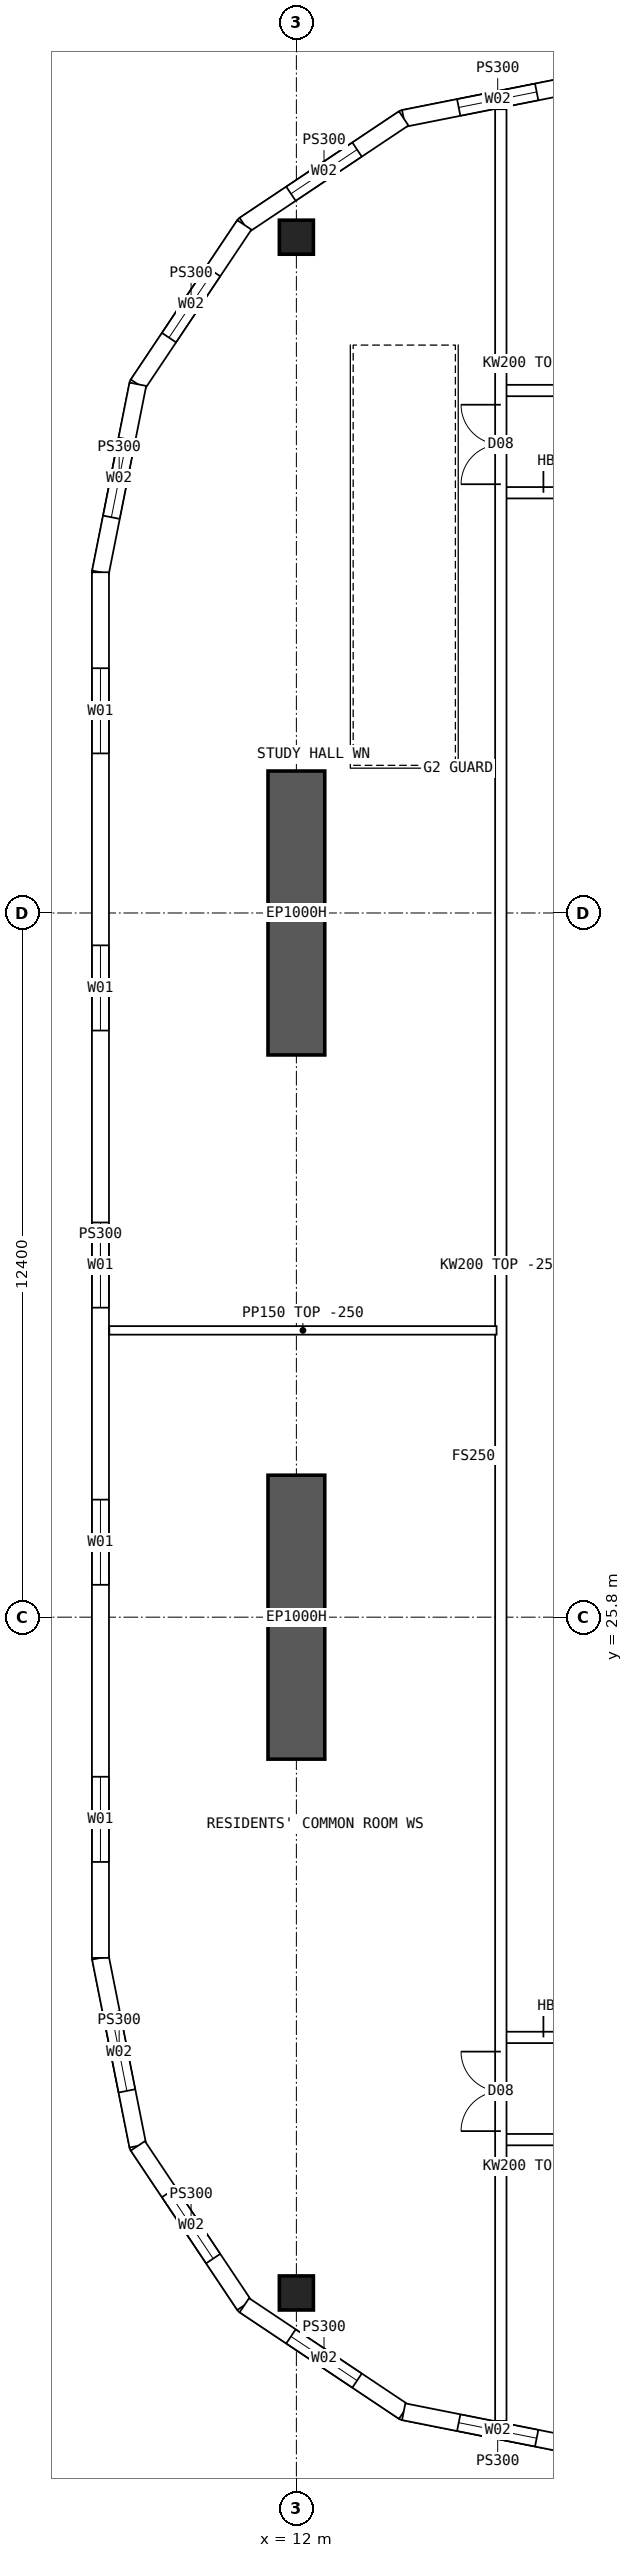
"""IFC4 building model, lengths in metres.
Left out: names, types, materials, properties, quantities, classifications, styles, units other than length and angle.
Written with IfcOpenShell. Run it as: python <this file> out.ifc"""

import sys

from ifc_helpers import new_model, si_unit, direction, frame, frame_2d, origin, origin_2d, place, context, subcontext, project, spatial, polyline, rectangle, hollow_rectangle, outline, extrude, element, fill, save


model = new_model("IFC4")
c1 = context("Model", 3, precision=1e-05, world=origin(), true_north=direction((0.0, 1.0)))
c2 = subcontext(c1, "Body", "Model", "MODEL_VIEW")
j1 = project(units=[si_unit("LENGTHUNIT", "METRE"), si_unit("PLANEANGLEUNIT", "RADIAN")], contexts=[c1])
p1 = place(None, origin())
s1 = spatial("IfcSite", under=j1, at=p1, CompositionType="ELEMENT")
p2 = place(p1, origin())
s2 = spatial("IfcBuilding", under=s1, at=p2, CompositionType="ELEMENT")
p3 = place(p2, frame((0.0, 0.0, 250.3)))
s3 = spatial("IfcBuildingStorey", under=s2, at=p3, CompositionType="ELEMENT", Elevation=250.3)
for number, where, z_axis, x_axis in (
    (1, (12.0, 13.9, 0.0), (0.0, 0.0, 1.0), (1.0, 0.0, 0.0)),
    (2, (12.0, 50.1, 0.0), (0.0, 0.0, 1.0), (1.0, 0.0, 0.0)),
):
    element("IfcColumn", number, at=place(p3, frame(where, z_axis=z_axis, x_axis=x_axis)), inside=s3, PredefinedType="COLUMN", context=c2, shape_type="SweptSolid", body=[
        extrude(hollow_rectangle(XDim=0.6, YDim=0.6, WallThickness=0.06, at=origin_2d()), origin(), (0.0, 0.0, 1.0), 3.75),
    ])
for number, where, z_axis, x_axis in (
    (3, (12.0, 23.3, 0.0), (0.0, 0.0, 1.0), (0.0, 1.0, 0.0)),
    (4, (12.0, 35.7, 0.0), (0.0, 0.0, 1.0), (0.0, 1.0, 0.0)),
):
    element("IfcWall", number, at=place(p3, frame(where, z_axis=z_axis, x_axis=x_axis)), inside=s3, PredefinedType="SHEAR", context=c2, shape_type="SweptSolid", body=[
        extrude(rectangle(XDim=5.0, YDim=1.0, at=frame_2d((2.5, 0.0))), origin(), (0.0, 0.0, 1.0), 3.75),
    ])
p4 = place(p3, frame((8.55, 44.2, 0.0), z_axis=(0.0, 0.0, 1.0), x_axis=(0.0, -1.0, 0.0)))
e5 = element("IfcWall", 5, at=p4, inside=s3, PredefinedType="SOLIDWALL", context=c2, shape_type="SweptSolid", body=[
    extrude(outline(polyline([(-0.015, -0.15), (24.415, -0.15), (24.385, 0.15), (0.015, 0.15), (-0.015, -0.15)])), origin(), (0.0, 0.0, 1.0), 3.5),
])
p5 = place(p4, frame((1.69, 0.0, 0.9)))
e6 = element("IfcOpeningElement", 6, at=p5, cuts=e5, PredefinedType="OPENING", context=c2, shape_type="SweptSolid", body=[
    extrude(rectangle(XDim=1.5, YDim=2.0, at=frame_2d((0.75, 1.0))), frame((0.0, 0.16, 0.0), z_axis=(0.0, -1.0, 0.0), x_axis=(1.0, 0.0, 0.0)), (0.0, 0.0, 1.0), 0.32),
])
p6 = place(p4, frame((6.57, 0.0, 0.9)))
e7 = element("IfcOpeningElement", 7, at=p6, cuts=e5, PredefinedType="OPENING", context=c2, shape_type="SweptSolid", body=[
    extrude(rectangle(XDim=1.5, YDim=2.0, at=frame_2d((0.75, 1.0))), frame((0.0, 0.16, 0.0), z_axis=(0.0, -1.0, 0.0), x_axis=(1.0, 0.0, 0.0)), (0.0, 0.0, 1.0), 0.32),
])
p7 = place(p4, frame((11.45, 0.0, 0.9)))
e8 = element("IfcOpeningElement", 8, at=p7, cuts=e5, PredefinedType="OPENING", context=c2, shape_type="SweptSolid", body=[
    extrude(rectangle(XDim=1.5, YDim=2.0, at=frame_2d((0.75, 1.0))), frame((0.0, 0.16, 0.0), z_axis=(0.0, -1.0, 0.0), x_axis=(1.0, 0.0, 0.0)), (0.0, 0.0, 1.0), 0.32),
])
p8 = place(p4, frame((16.33, 0.0, 0.9)))
e9 = element("IfcOpeningElement", 9, at=p8, cuts=e5, PredefinedType="OPENING", context=c2, shape_type="SweptSolid", body=[
    extrude(rectangle(XDim=1.5, YDim=2.0, at=frame_2d((0.75, 1.0))), frame((0.0, 0.16, 0.0), z_axis=(0.0, -1.0, 0.0), x_axis=(1.0, 0.0, 0.0)), (0.0, 0.0, 1.0), 0.32),
])
p9 = place(p4, frame((21.21, 0.0, 0.9)))
e10 = element("IfcOpeningElement", 10, at=p9, cuts=e5, PredefinedType="OPENING", context=c2, shape_type="SweptSolid", body=[
    extrude(rectangle(XDim=1.5, YDim=2.0, at=frame_2d((0.75, 1.0))), frame((0.0, 0.16, 0.0), z_axis=(0.0, -1.0, 0.0), x_axis=(1.0, 0.0, 0.0)), (0.0, 0.0, 1.0), 0.32),
])
p10 = place(p3, frame((17.2, 52.85, 0.0), z_axis=(0.0, 0.0, 1.0), x_axis=(-0.98078325777, -0.195100490205, 0.0)))
e11 = element("IfcWall", 11, at=p10, inside=s3, PredefinedType="SOLIDWALL", context=c2, shape_type="SweptSolid", body=[
    extrude(outline(polyline([(-0.03, -0.15), (3.405, -0.15), (3.345, 0.15), (0.03, 0.15), (-0.03, -0.15)])), origin(), (0.0, 0.0, 1.0), 3.5),
])
p11 = place(p10, frame((0.988, 0.0, 0.9)))
e12 = element("IfcOpeningElement", 12, at=p11, cuts=e11, PredefinedType="OPENING", context=c2, shape_type="SweptSolid", body=[
    extrude(rectangle(XDim=1.4, YDim=1.8, at=frame_2d((0.7, 0.9))), frame((0.0, 0.16, 0.0), z_axis=(0.0, -1.0, 0.0), x_axis=(1.0, 0.0, 0.0)), (0.0, 0.0, 1.0), 0.32),
])
p12 = place(p3, frame((13.89, 52.192, 0.0), z_axis=(0.0, 0.0, 1.0), x_axis=(-0.831460037396, -0.555584562613, 0.0)))
e13 = element("IfcWall", 13, at=p12, inside=s3, PredefinedType="SOLIDWALL", context=c2, shape_type="SweptSolid", body=[
    extrude(outline(polyline([(-0.03, -0.15), (3.405, -0.15), (3.345, 0.15), (0.03, 0.15), (-0.03, -0.15)])), origin(), (0.0, 0.0, 1.0), 3.5),
])
p13 = place(p12, frame((0.988, 0.0, 0.9)))
e14 = element("IfcOpeningElement", 14, at=p13, cuts=e13, PredefinedType="OPENING", context=c2, shape_type="SweptSolid", body=[
    extrude(rectangle(XDim=1.4, YDim=1.8, at=frame_2d((0.7, 0.9))), frame((0.0, 0.16, 0.0), z_axis=(0.0, -1.0, 0.0), x_axis=(1.0, 0.0, 0.0)), (0.0, 0.0, 1.0), 0.32),
])
p14 = place(p3, frame((11.083, 50.316, 0.0), z_axis=(0.0, 0.0, 1.0), x_axis=(-0.555567969291, -0.831471124873, 0.0)))
e15 = element("IfcWall", 15, at=p14, inside=s3, PredefinedType="SOLIDWALL", context=c2, shape_type="SweptSolid", body=[
    extrude(outline(polyline([(-0.03, -0.15), (3.405, -0.15), (3.345, 0.15), (0.03, 0.15), (-0.03, -0.15)])), origin(), (0.0, 0.0, 1.0), 3.5),
])
p15 = place(p14, frame((0.988, 0.0, 0.9)))
e16 = element("IfcOpeningElement", 16, at=p15, cuts=e15, PredefinedType="OPENING", context=c2, shape_type="SweptSolid", body=[
    extrude(rectangle(XDim=1.4, YDim=1.8, at=frame_2d((0.7, 0.9))), frame((0.0, 0.16, 0.0), z_axis=(0.0, -1.0, 0.0), x_axis=(1.0, 0.0, 0.0)), (0.0, 0.0, 1.0), 0.32),
])
p16 = place(p3, frame((9.208, 47.51, 0.0), z_axis=(0.0, 0.0, 1.0), x_axis=(-0.19508664885, -0.980786011034, 0.0)))
e17 = element("IfcWall", 17, at=p16, inside=s3, PredefinedType="SOLIDWALL", context=c2, shape_type="SweptSolid", body=[
    extrude(outline(polyline([(-0.03, -0.15), (3.39, -0.15), (3.36, 0.15), (0.03, 0.15), (-0.03, -0.15)])), origin(), (0.0, 0.0, 1.0), 3.5),
])
p17 = place(p16, frame((0.988, 0.0, 0.9)))
e18 = element("IfcOpeningElement", 18, at=p17, cuts=e17, PredefinedType="OPENING", context=c2, shape_type="SweptSolid", body=[
    extrude(rectangle(XDim=1.4, YDim=1.8, at=frame_2d((0.7, 0.9))), frame((0.0, 0.16, 0.0), z_axis=(0.0, -1.0, 0.0), x_axis=(1.0, 0.0, 0.0)), (0.0, 0.0, 1.0), 0.32),
])
p18 = place(p3, frame((8.55, 19.8, 0.0), z_axis=(0.0, 0.0, 1.0), x_axis=(0.19508664885, -0.980786011034, 0.0)))
e19 = element("IfcWall", 19, at=p18, inside=s3, PredefinedType="SOLIDWALL", context=c2, shape_type="SweptSolid", body=[
    extrude(outline(polyline([(-0.015, -0.15), (3.405, -0.15), (3.345, 0.15), (0.015, 0.15), (-0.015, -0.15)])), origin(), (0.0, 0.0, 1.0), 3.5),
])
p19 = place(p18, frame((0.988, 0.0, 0.9)))
e20 = element("IfcOpeningElement", 20, at=p19, cuts=e19, PredefinedType="OPENING", context=c2, shape_type="SweptSolid", body=[
    extrude(rectangle(XDim=1.4, YDim=1.8, at=frame_2d((0.7, 0.9))), frame((0.0, 0.16, 0.0), z_axis=(0.0, -1.0, 0.0), x_axis=(1.0, 0.0, 0.0)), (0.0, 0.0, 1.0), 0.32),
])
p20 = place(p3, frame((9.208, 16.49, 0.0), z_axis=(0.0, 0.0, 1.0), x_axis=(0.555567969291, -0.831471124873, 0.0)))
e21 = element("IfcWall", 21, at=p20, inside=s3, PredefinedType="SOLIDWALL", context=c2, shape_type="SweptSolid", body=[
    extrude(outline(polyline([(-0.03, -0.15), (3.405, -0.15), (3.345, 0.15), (0.03, 0.15), (-0.03, -0.15)])), origin(), (0.0, 0.0, 1.0), 3.5),
])
p21 = place(p20, frame((0.988, 0.0, 0.9)))
e22 = element("IfcOpeningElement", 22, at=p21, cuts=e21, PredefinedType="OPENING", context=c2, shape_type="SweptSolid", body=[
    extrude(rectangle(XDim=1.4, YDim=1.8, at=frame_2d((0.7, 0.9))), frame((0.0, 0.16, 0.0), z_axis=(0.0, -1.0, 0.0), x_axis=(1.0, 0.0, 0.0)), (0.0, 0.0, 1.0), 0.32),
])
p22 = place(p3, frame((11.083, 13.684, 0.0), z_axis=(0.0, 0.0, 1.0), x_axis=(0.831460037396, -0.555584562613, 0.0)))
e23 = element("IfcWall", 23, at=p22, inside=s3, PredefinedType="SOLIDWALL", context=c2, shape_type="SweptSolid", body=[
    extrude(outline(polyline([(-0.03, -0.15), (3.405, -0.15), (3.345, 0.15), (0.03, 0.15), (-0.03, -0.15)])), origin(), (0.0, 0.0, 1.0), 3.5),
])
p23 = place(p22, frame((0.988, 0.0, 0.9)))
e24 = element("IfcOpeningElement", 24, at=p23, cuts=e23, PredefinedType="OPENING", context=c2, shape_type="SweptSolid", body=[
    extrude(rectangle(XDim=1.4, YDim=1.8, at=frame_2d((0.7, 0.9))), frame((0.0, 0.16, 0.0), z_axis=(0.0, -1.0, 0.0), x_axis=(1.0, 0.0, 0.0)), (0.0, 0.0, 1.0), 0.32),
])
p24 = place(p3, frame((13.89, 11.808, 0.0), z_axis=(0.0, 0.0, 1.0), x_axis=(0.98078325777, -0.195100490205, 0.0)))
e25 = element("IfcWall", 25, at=p24, inside=s3, PredefinedType="SOLIDWALL", context=c2, shape_type="SweptSolid", body=[
    extrude(outline(polyline([(-0.03, -0.15), (3.405, -0.15), (3.345, 0.15), (0.03, 0.15), (-0.03, -0.15)])), origin(), (0.0, 0.0, 1.0), 3.5),
])
p25 = place(p24, frame((0.988, 0.0, 0.9)))
e26 = element("IfcOpeningElement", 26, at=p25, cuts=e25, PredefinedType="OPENING", context=c2, shape_type="SweptSolid", body=[
    extrude(rectangle(XDim=1.4, YDim=1.8, at=frame_2d((0.7, 0.9))), frame((0.0, 0.16, 0.0), z_axis=(0.0, -1.0, 0.0), x_axis=(1.0, 0.0, 0.0)), (0.0, 0.0, 1.0), 0.32),
])
p26 = place(p3, frame((15.6, 16.6, 0.0), z_axis=(0.0, 0.0, 1.0), x_axis=(1.0, 0.0, 0.0)))
e27 = element("IfcWall", 27, at=p26, inside=s3, PredefinedType="SOLIDWALL", context=c2, shape_type="SweptSolid", body=[
    extrude(rectangle(XDim=2.05, YDim=0.2, at=frame_2d((1.025, 0.0))), origin(), (0.0, 0.0, 1.0), 3.5),
])
p27 = place(p26, frame((0.95, 0.0, 0.0)))
e28 = element("IfcOpeningElement", 28, at=p27, cuts=e27, PredefinedType="OPENING", context=c2, shape_type="SweptSolid", body=[
    extrude(rectangle(XDim=0.9, YDim=2.1, at=frame_2d((0.45, 1.05))), frame((0.0, 0.11, 0.0), z_axis=(0.0, -1.0, 0.0), x_axis=(1.0, 0.0, 0.0)), (0.0, 0.0, 1.0), 0.22),
])
p28 = place(p3, frame((15.6, 18.4, 0.0), z_axis=(0.0, 0.0, 1.0), x_axis=(1.0, 0.0, 0.0)))
e29 = element("IfcWall", 29, at=p28, inside=s3, PredefinedType="SOLIDWALL", context=c2, shape_type="SweptSolid", body=[
    extrude(rectangle(XDim=2.05, YDim=0.2, at=frame_2d((1.025, 0.0))), origin(), (0.0, 0.0, 1.0), 3.5),
])
p29 = place(p28, frame((0.75, 0.0, 0.0)))
e30 = element("IfcOpeningElement", 30, at=p29, cuts=e29, PredefinedType="OPENING", context=c2, shape_type="SweptSolid", body=[
    extrude(rectangle(XDim=1.2, YDim=2.1, at=frame_2d((0.6, 1.05))), frame((0.0, 0.11, 0.0), z_axis=(0.0, -1.0, 0.0), x_axis=(1.0, 0.0, 0.0)), (0.0, 0.0, 1.0), 0.22),
])
p30 = place(p3, frame((15.6, 47.4, 0.0), z_axis=(0.0, 0.0, 1.0), x_axis=(1.0, 0.0, 0.0)))
e31 = element("IfcWall", 31, at=p30, inside=s3, PredefinedType="SOLIDWALL", context=c2, shape_type="SweptSolid", body=[
    extrude(rectangle(XDim=2.05, YDim=0.2, at=frame_2d((1.025, 0.0))), origin(), (0.0, 0.0, 1.0), 3.5),
])
p31 = place(p30, frame((0.95, 0.0, 0.0)))
e32 = element("IfcOpeningElement", 32, at=p31, cuts=e31, PredefinedType="OPENING", context=c2, shape_type="SweptSolid", body=[
    extrude(rectangle(XDim=0.9, YDim=2.1, at=frame_2d((0.45, 1.05))), frame((0.0, 0.11, 0.0), z_axis=(0.0, -1.0, 0.0), x_axis=(1.0, 0.0, 0.0)), (0.0, 0.0, 1.0), 0.22),
])
p32 = place(p3, frame((15.6, 45.6, 0.0), z_axis=(0.0, 0.0, 1.0), x_axis=(1.0, 0.0, 0.0)))
e33 = element("IfcWall", 33, at=p32, inside=s3, PredefinedType="SOLIDWALL", context=c2, shape_type="SweptSolid", body=[
    extrude(rectangle(XDim=2.05, YDim=0.2, at=frame_2d((1.025, 0.0))), origin(), (0.0, 0.0, 1.0), 3.5),
])
p33 = place(p32, frame((0.75, 0.0, 0.0)))
e34 = element("IfcOpeningElement", 34, at=p33, cuts=e33, PredefinedType="OPENING", context=c2, shape_type="SweptSolid", body=[
    extrude(rectangle(XDim=1.2, YDim=2.1, at=frame_2d((0.6, 1.05))), frame((0.0, 0.11, 0.0), z_axis=(0.0, -1.0, 0.0), x_axis=(1.0, 0.0, 0.0)), (0.0, 0.0, 1.0), 0.22),
])
p34 = place(p3, frame((8.705, 30.85, 0.0), z_axis=(0.0, 0.0, 1.0), x_axis=(1.0, 0.0, 0.0)))
e35 = element("IfcWall", 35, at=p34, inside=s3, PredefinedType="PARTITIONING", context=c2, shape_type="SweptSolid", body=[
    extrude(outline(polyline([(0.0, 0.0), (6.82, 0.0), (6.82, 3.5), (3.597, 3.5), (3.595, 3.05), (2.997, 3.05), (2.995, 3.5), (0.0, 3.5), (0.0, 0.0)])), frame((0.0, 0.075, 0.0), z_axis=(0.0, -1.0, 0.0), x_axis=(1.0, 0.0, 0.0)), (0.0, 0.0, 1.0), 0.15),
])
p35 = place(p3, frame((15.6, 11.646, 0.0), z_axis=(0.0, 0.0, 1.0), x_axis=(0.0, 1.0, 0.0)))
e36 = element("IfcWall", 36, at=p35, inside=s3, PredefinedType="SOLIDWALL", context=c2, shape_type="SweptSolid", body=[
    extrude(rectangle(XDim=40.708, YDim=0.2, at=frame_2d((20.354, 0.0))), origin(), (0.0, 0.0, 1.0), 3.5),
])
p36 = place(p35, frame((5.104, 0.0, 0.0)))
e37 = element("IfcOpeningElement", 37, at=p36, cuts=e36, PredefinedType="OPENING", context=c2, shape_type="SweptSolid", body=[
    extrude(rectangle(XDim=1.4, YDim=2.1, at=frame_2d((0.7, 1.05))), frame((0.0, 0.11, 0.0), z_axis=(0.0, -1.0, 0.0), x_axis=(1.0, 0.0, 0.0)), (0.0, 0.0, 1.0), 0.22),
])
p37 = place(p35, frame((34.104, 0.0, 0.0)))
e38 = element("IfcOpeningElement", 38, at=p37, cuts=e36, PredefinedType="OPENING", context=c2, shape_type="SweptSolid", body=[
    extrude(rectangle(XDim=1.4, YDim=2.1, at=frame_2d((0.7, 1.05))), frame((0.0, 0.11, 0.0), z_axis=(0.0, -1.0, 0.0), x_axis=(1.0, 0.0, 0.0)), (0.0, 0.0, 1.0), 0.22),
])
p38 = place(p5, origin())
e39 = element("IfcWindow", 39, at=p38, inside=s3, PartitioningType="SINGLE_PANEL", PredefinedType="WINDOW", context=c2, shape_type="SweptSolid", body=[
    extrude(rectangle(XDim=1.5, YDim=2.0, at=frame_2d((0.75, 1.0))), frame((0.0, 0.03, 0.0), z_axis=(0.0, -1.0, 0.0), x_axis=(1.0, 0.0, 0.0)), (0.0, 0.0, 1.0), 0.06),
])
fill(e6, e39)
p39 = place(p6, origin())
e40 = element("IfcWindow", 40, at=p39, inside=s3, PartitioningType="SINGLE_PANEL", PredefinedType="WINDOW", context=c2, shape_type="SweptSolid", body=[
    extrude(rectangle(XDim=1.5, YDim=2.0, at=frame_2d((0.75, 1.0))), frame((0.0, 0.03, 0.0), z_axis=(0.0, -1.0, 0.0), x_axis=(1.0, 0.0, 0.0)), (0.0, 0.0, 1.0), 0.06),
])
fill(e7, e40)
p40 = place(p7, origin())
e41 = element("IfcWindow", 41, at=p40, inside=s3, PartitioningType="SINGLE_PANEL", PredefinedType="WINDOW", context=c2, shape_type="SweptSolid", body=[
    extrude(rectangle(XDim=1.5, YDim=2.0, at=frame_2d((0.75, 1.0))), frame((0.0, 0.03, 0.0), z_axis=(0.0, -1.0, 0.0), x_axis=(1.0, 0.0, 0.0)), (0.0, 0.0, 1.0), 0.06),
])
fill(e8, e41)
p41 = place(p8, origin())
e42 = element("IfcWindow", 42, at=p41, inside=s3, PartitioningType="SINGLE_PANEL", PredefinedType="WINDOW", context=c2, shape_type="SweptSolid", body=[
    extrude(rectangle(XDim=1.5, YDim=2.0, at=frame_2d((0.75, 1.0))), frame((0.0, 0.03, 0.0), z_axis=(0.0, -1.0, 0.0), x_axis=(1.0, 0.0, 0.0)), (0.0, 0.0, 1.0), 0.06),
])
fill(e9, e42)
p42 = place(p9, origin())
e43 = element("IfcWindow", 43, at=p42, inside=s3, PartitioningType="SINGLE_PANEL", PredefinedType="WINDOW", context=c2, shape_type="SweptSolid", body=[
    extrude(rectangle(XDim=1.5, YDim=2.0, at=frame_2d((0.75, 1.0))), frame((0.0, 0.03, 0.0), z_axis=(0.0, -1.0, 0.0), x_axis=(1.0, 0.0, 0.0)), (0.0, 0.0, 1.0), 0.06),
])
fill(e10, e43)
p43 = place(p11, origin())
e44 = element("IfcWindow", 44, at=p43, inside=s3, PartitioningType="SINGLE_PANEL", PredefinedType="WINDOW", context=c2, shape_type="SweptSolid", body=[
    extrude(rectangle(XDim=1.4, YDim=1.8, at=frame_2d((0.7, 0.9))), frame((0.0, 0.03, 0.0), z_axis=(0.0, -1.0, 0.0), x_axis=(1.0, 0.0, 0.0)), (0.0, 0.0, 1.0), 0.06),
])
fill(e12, e44)
p44 = place(p13, origin())
e45 = element("IfcWindow", 45, at=p44, inside=s3, PartitioningType="SINGLE_PANEL", PredefinedType="WINDOW", context=c2, shape_type="SweptSolid", body=[
    extrude(rectangle(XDim=1.4, YDim=1.8, at=frame_2d((0.7, 0.9))), frame((0.0, 0.03, 0.0), z_axis=(0.0, -1.0, 0.0), x_axis=(1.0, 0.0, 0.0)), (0.0, 0.0, 1.0), 0.06),
])
fill(e14, e45)
p45 = place(p15, origin())
e46 = element("IfcWindow", 46, at=p45, inside=s3, PartitioningType="SINGLE_PANEL", PredefinedType="WINDOW", context=c2, shape_type="SweptSolid", body=[
    extrude(rectangle(XDim=1.4, YDim=1.8, at=frame_2d((0.7, 0.9))), frame((0.0, 0.03, 0.0), z_axis=(0.0, -1.0, 0.0), x_axis=(1.0, 0.0, 0.0)), (0.0, 0.0, 1.0), 0.06),
])
fill(e16, e46)
p46 = place(p17, origin())
e47 = element("IfcWindow", 47, at=p46, inside=s3, PartitioningType="SINGLE_PANEL", PredefinedType="WINDOW", context=c2, shape_type="SweptSolid", body=[
    extrude(rectangle(XDim=1.4, YDim=1.8, at=frame_2d((0.7, 0.9))), frame((0.0, 0.03, 0.0), z_axis=(0.0, -1.0, 0.0), x_axis=(1.0, 0.0, 0.0)), (0.0, 0.0, 1.0), 0.06),
])
fill(e18, e47)
p47 = place(p19, origin())
e48 = element("IfcWindow", 48, at=p47, inside=s3, PartitioningType="SINGLE_PANEL", PredefinedType="WINDOW", context=c2, shape_type="SweptSolid", body=[
    extrude(rectangle(XDim=1.4, YDim=1.8, at=frame_2d((0.7, 0.9))), frame((0.0, 0.03, 0.0), z_axis=(0.0, -1.0, 0.0), x_axis=(1.0, 0.0, 0.0)), (0.0, 0.0, 1.0), 0.06),
])
fill(e20, e48)
p48 = place(p21, origin())
e49 = element("IfcWindow", 49, at=p48, inside=s3, PartitioningType="SINGLE_PANEL", PredefinedType="WINDOW", context=c2, shape_type="SweptSolid", body=[
    extrude(rectangle(XDim=1.4, YDim=1.8, at=frame_2d((0.7, 0.9))), frame((0.0, 0.03, 0.0), z_axis=(0.0, -1.0, 0.0), x_axis=(1.0, 0.0, 0.0)), (0.0, 0.0, 1.0), 0.06),
])
fill(e22, e49)
p49 = place(p23, origin())
e50 = element("IfcWindow", 50, at=p49, inside=s3, PartitioningType="SINGLE_PANEL", PredefinedType="WINDOW", context=c2, shape_type="SweptSolid", body=[
    extrude(rectangle(XDim=1.4, YDim=1.8, at=frame_2d((0.7, 0.9))), frame((0.0, 0.03, 0.0), z_axis=(0.0, -1.0, 0.0), x_axis=(1.0, 0.0, 0.0)), (0.0, 0.0, 1.0), 0.06),
])
fill(e24, e50)
p50 = place(p25, origin())
e51 = element("IfcWindow", 51, at=p50, inside=s3, PartitioningType="SINGLE_PANEL", PredefinedType="WINDOW", context=c2, shape_type="SweptSolid", body=[
    extrude(rectangle(XDim=1.4, YDim=1.8, at=frame_2d((0.7, 0.9))), frame((0.0, 0.03, 0.0), z_axis=(0.0, -1.0, 0.0), x_axis=(1.0, 0.0, 0.0)), (0.0, 0.0, 1.0), 0.06),
])
fill(e26, e51)
p51 = place(p29, origin())
e52 = element("IfcDoor", 52, at=p51, inside=s3, OperationType="DOUBLE_DOOR_SINGLE_SWING", PredefinedType="DOOR", context=c2, shape_type="SweptSolid", body=[
    extrude(rectangle(XDim=1.2, YDim=2.1, at=frame_2d((0.6, 1.05))), frame((0.0, 0.025, 0.0), z_axis=(0.0, -1.0, 0.0), x_axis=(1.0, 0.0, 0.0)), (0.0, 0.0, 1.0), 0.05),
])
fill(e30, e52)
p52 = place(p33, origin())
e53 = element("IfcDoor", 53, at=p52, inside=s3, OperationType="DOUBLE_DOOR_SINGLE_SWING", PredefinedType="DOOR", context=c2, shape_type="SweptSolid", body=[
    extrude(rectangle(XDim=1.2, YDim=2.1, at=frame_2d((0.6, 1.05))), frame((0.0, 0.025, 0.0), z_axis=(0.0, -1.0, 0.0), x_axis=(1.0, 0.0, 0.0)), (0.0, 0.0, 1.0), 0.05),
])
fill(e34, e53)
p53 = place(p36, origin())
e54 = element("IfcDoor", 54, at=p53, inside=s3, OperationType="DOUBLE_DOOR_SINGLE_SWING", PredefinedType="DOOR", context=c2, shape_type="SweptSolid", body=[
    extrude(rectangle(XDim=1.4, YDim=2.1, at=frame_2d((0.7, 1.05))), frame((0.0, 0.025, 0.0), z_axis=(0.0, -1.0, 0.0), x_axis=(1.0, 0.0, 0.0)), (0.0, 0.0, 1.0), 0.05),
])
fill(e37, e54)
p54 = place(p37, origin())
e55 = element("IfcDoor", 55, at=p54, inside=s3, OperationType="DOUBLE_DOOR_SINGLE_SWING", PredefinedType="DOOR", context=c2, shape_type="SweptSolid", body=[
    extrude(rectangle(XDim=1.4, YDim=2.1, at=frame_2d((0.7, 1.05))), frame((0.0, 0.025, 0.0), z_axis=(0.0, -1.0, 0.0), x_axis=(1.0, 0.0, 0.0)), (0.0, 0.0, 1.0), 0.05),
])
fill(e38, e55)
save(model, sys.argv[1])
